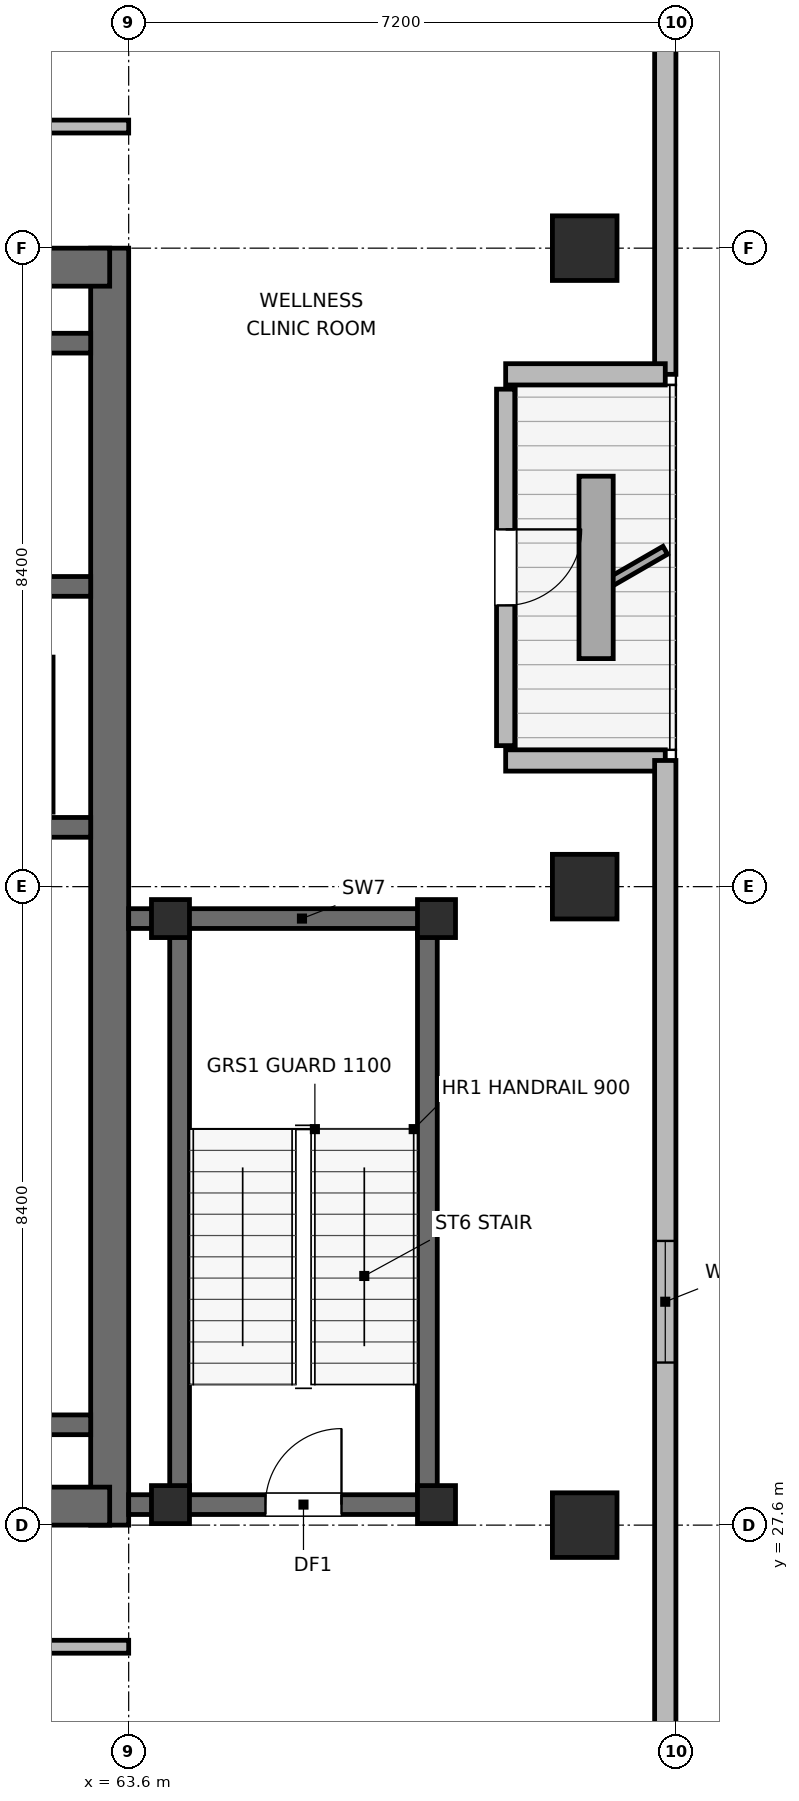
"""IFC4 building model, lengths in metres.
Left out: names, types, materials, properties, quantities, classifications, styles, units other than length and angle.
Written with IfcOpenShell. Run it as: python <this file> out.ifc"""

import sys

from ifc_helpers import new_model, si_unit, direction, frame, frame_2d, origin, origin_2d, place, context, subcontext, project, spatial, rectangle, hollow_rectangle, extrude, element, fill, save


model = new_model("IFC4")
c1 = context("Model", 3, precision=1e-05, world=origin(), true_north=direction((0.0, 1.0)))
c2 = subcontext(c1, "Body", "Model", "MODEL_VIEW")
j1 = project(units=[si_unit("LENGTHUNIT", "METRE"), si_unit("PLANEANGLEUNIT", "RADIAN")], contexts=[c1])
p1 = place(None, origin())
s1 = spatial("IfcSite", under=j1, at=p1, CompositionType="ELEMENT")
p2 = place(p1, origin())
s2 = spatial("IfcBuilding", under=s1, at=p2, CompositionType="ELEMENT")
p3 = place(p2, frame((0.0, 0.0, 350.4)))
s3 = spatial("IfcBuildingStorey", under=s2, at=p3, CompositionType="ELEMENT", Elevation=350.4)
p4 = place(p3, frame((63.35, 27.6, 0.0), z_axis=(0.0, 0.0, 1.0), x_axis=(0.0, 1.0, 0.0)))
e1 = element("IfcWall", 1, at=p4, inside=s3, PredefinedType="SHEAR", context=c2, shape_type="SweptSolid", body=[
    extrude(rectangle(XDim=16.8, YDim=0.5, at=frame_2d((8.4, 0.0))), origin(), (0.0, 0.0, 1.0), 4.5),
])
p5 = place(p3, frame((53.85, 27.85, 0.0), z_axis=(0.0, 0.0, 1.0), x_axis=(1.0, 0.0, 0.0)))
e2 = element("IfcWall", 2, at=p5, inside=s3, PredefinedType="SHEAR", context=c2, shape_type="SweptSolid", body=[
    extrude(rectangle(XDim=9.5, YDim=0.5, at=frame_2d((4.75, 0.0))), origin(), (0.0, 0.0, 1.0), 4.5),
])
p6 = place(p5, frame((4.025, 0.0, 0.0)))
e3 = element("IfcOpeningElement", 3, at=p6, cuts=e2, PredefinedType="OPENING", context=c2, shape_type="SweptSolid", body=[
    extrude(rectangle(XDim=1.05, YDim=2.04, at=frame_2d((0.525, 1.02))), frame((0.0, 0.26, 0.0), z_axis=(0.0, -1.0, 0.0), x_axis=(1.0, 0.0, 0.0)), (0.0, 0.0, 1.0), 0.52),
])
p7 = place(p3, frame((53.85, 44.15, 0.0), z_axis=(0.0, 0.0, 1.0), x_axis=(1.0, 0.0, 0.0)))
e4 = element("IfcWall", 4, at=p7, inside=s3, PredefinedType="SHEAR", context=c2, shape_type="SweptSolid", body=[
    extrude(rectangle(XDim=9.5, YDim=0.5, at=frame_2d((4.75, 0.0))), origin(), (0.0, 0.0, 1.0), 4.5),
])
for number, where, z_axis, x_axis in (
    (5, (58.89, 28.92, 0.0), (0.0, 0.0, 1.0), (1.0, 0.0, 0.0)),
    (6, (58.89, 36.78, 0.0), (0.0, 0.0, 1.0), (1.0, 0.0, 0.0)),
):
    element("IfcWall", number, at=place(p3, frame(where, z_axis=z_axis, x_axis=x_axis)), inside=s3, PredefinedType="SHEAR", context=c2, shape_type="SweptSolid", body=[
        extrude(rectangle(XDim=4.21, YDim=0.26, at=frame_2d((2.105, 0.0))), origin(), (0.0, 0.0, 1.0), 4.5),
    ])
p8 = place(p3, frame((54.1, 39.95, 0.0), z_axis=(0.0, 0.0, 1.0), x_axis=(1.0, 0.0, 0.0)))
e7 = element("IfcWall", 7, at=p8, inside=s3, PredefinedType="SHEAR", context=c2, shape_type="SweptSolid", body=[
    extrude(rectangle(XDim=9.0, YDim=0.26, at=frame_2d((4.5, 0.0))), origin(), (0.0, 0.0, 1.0), 4.5),
])
p9 = place(p8, frame((1.1, 0.0, 0.0)))
e8 = element("IfcOpeningElement", 8, at=p9, cuts=e7, PredefinedType="OPENING", context=c2, shape_type="SweptSolid", body=[
    extrude(rectangle(XDim=1.0, YDim=2.04, at=frame_2d((0.5, 1.02))), frame((0.0, 0.14, 0.0), z_axis=(0.0, -1.0, 0.0), x_axis=(1.0, 0.0, 0.0)), (0.0, 0.0, 1.0), 0.28),
])
p10 = place(p3, frame((54.1, 43.15, 0.0), z_axis=(0.0, 0.0, 1.0), x_axis=(1.0, 0.0, 0.0)))
e9 = element("IfcWall", 9, at=p10, inside=s3, PredefinedType="SHEAR", context=c2, shape_type="SweptSolid", body=[
    extrude(rectangle(XDim=9.0, YDim=0.26, at=frame_2d((4.5, 0.0))), origin(), (0.0, 0.0, 1.0), 4.5),
])
p11 = place(p3, frame((63.6, 27.87, 0.0), z_axis=(0.0, 0.0, 1.0), x_axis=(1.0, 0.0, 0.0)))
e10 = element("IfcWall", 10, at=p11, inside=s3, PredefinedType="SHEAR", context=c2, shape_type="SweptSolid", body=[
    extrude(rectangle(XDim=4.06, YDim=0.26, at=frame_2d((2.03, 0.0))), origin(), (0.0, 0.0, 1.0), 4.5),
])
p12 = place(p11, frame((1.8, 0.0, 0.0)))
e11 = element("IfcOpeningElement", 11, at=p12, cuts=e10, PredefinedType="OPENING", context=c2, shape_type="SweptSolid", body=[
    extrude(rectangle(XDim=1.0, YDim=2.04, at=frame_2d((0.5, 1.02))), frame((0.0, 0.14, 0.0), z_axis=(0.0, -1.0, 0.0), x_axis=(1.0, 0.0, 0.0)), (0.0, 0.0, 1.0), 0.28),
])
p13 = place(p3, frame((63.6, 35.58, 0.0), z_axis=(0.0, 0.0, 1.0), x_axis=(1.0, 0.0, 0.0)))
e12 = element("IfcWall", 12, at=p13, inside=s3, PredefinedType="SHEAR", context=c2, shape_type="SweptSolid", body=[
    extrude(rectangle(XDim=4.06, YDim=0.26, at=frame_2d((2.03, 0.0))), origin(), (0.0, 0.0, 1.0), 4.5),
])
for number, where, z_axis, x_axis in (
    (13, (64.27, 28.0, 0.0), (0.0, 0.0, 1.0), (0.0, 1.0, 0.0)),
    (14, (67.53, 28.0, 0.0), (0.0, 0.0, 1.0), (0.0, 1.0, 0.0)),
):
    element("IfcWall", number, at=place(p3, frame(where, z_axis=z_axis, x_axis=x_axis)), inside=s3, PredefinedType="SHEAR", context=c2, shape_type="SweptSolid", body=[
        extrude(rectangle(XDim=7.45, YDim=0.26, at=frame_2d((3.725, 0.0))), origin(), (0.0, 0.0, 1.0), 4.5),
    ])
for number, where, z_axis, x_axis in (
    (15, (69.6, 27.6, 0.0), (0.0, 0.0, 1.0), (1.0, 0.0, 0.0)),
    (16, (69.6, 36.0, 0.0), (0.0, 0.0, 1.0), (1.0, 0.0, 0.0)),
    (17, (69.6, 44.4, 0.0), (0.0, 0.0, 1.0), (1.0, 0.0, 0.0)),
):
    element("IfcColumn", number, at=place(p3, frame(where, z_axis=z_axis, x_axis=x_axis)), inside=s3, PredefinedType="COLUMN", context=c2, shape_type="SweptSolid", body=[
        extrude(rectangle(XDim=0.85, YDim=0.85, at=origin_2d()), origin(), (0.0, 0.0, 1.0), 4.5),
    ])
for number, where, z_axis, x_axis in (
    (18, (64.15, 27.87, 0.0), (0.0, 0.0, 1.0), (1.0, 0.0, 0.0)),
    (19, (67.65, 27.87, 0.0), (0.0, 0.0, 1.0), (1.0, 0.0, 0.0)),
    (20, (64.15, 35.58, 0.0), (0.0, 0.0, 1.0), (1.0, 0.0, 0.0)),
    (21, (67.65, 35.58, 0.0), (0.0, 0.0, 1.0), (1.0, 0.0, 0.0)),
):
    element("IfcColumn", number, at=place(p3, frame(where, z_axis=z_axis, x_axis=x_axis)), inside=s3, PredefinedType="PILASTER", context=c2, shape_type="SweptSolid", body=[
        extrude(hollow_rectangle(XDim=0.5, YDim=0.5, WallThickness=0.025, at=origin_2d()), origin(), (0.0, 0.0, 1.0), 4.5),
    ])
p14 = place(p3, frame((70.66, 48.582, 0.0), z_axis=(0.0, 0.0, 1.0), x_axis=(0.0, -1.0, 0.0)))
e22 = element("IfcWall", 22, at=p14, inside=s3, PredefinedType="SOLIDWALL", context=c2, shape_type="SweptSolid", body=[
    extrude(rectangle(XDim=5.842, YDim=0.28, at=frame_2d((2.921, 0.0))), origin(), (0.0, 0.0, 1.0), 4.2),
])
p15 = place(p3, frame((70.66, 42.74, 0.0), z_axis=(0.0, 0.0, 1.0), x_axis=(-1.0, 0.0, 0.0)))
e23 = element("IfcWall", 23, at=p15, inside=s3, PredefinedType="SOLIDWALL", context=c2, shape_type="SweptSolid", body=[
    extrude(rectangle(XDim=2.1, YDim=0.28, at=frame_2d((1.05, 0.0))), origin(), (0.0, 0.0, 1.0), 2.695),
])
p16 = place(p3, frame((68.56, 42.545, 0.0), z_axis=(0.0, 0.0, 1.0), x_axis=(0.0, -1.0, 0.0)))
e24 = element("IfcWall", 24, at=p16, inside=s3, PredefinedType="SOLIDWALL", context=c2, shape_type="SweptSolid", body=[
    extrude(rectangle(XDim=4.69, YDim=0.24, at=frame_2d((2.345, 0.0))), origin(), (0.0, 0.0, 1.0), 3.791),
])
p17 = place(p16, frame((1.845, 0.0, 0.0)))
e25 = element("IfcOpeningElement", 25, at=p17, cuts=e24, PredefinedType="OPENING", context=c2, shape_type="SweptSolid", body=[
    extrude(rectangle(XDim=1.0, YDim=2.02, at=frame_2d((0.5, 1.01))), frame((0.0, 0.13, 0.0), z_axis=(0.0, -1.0, 0.0), x_axis=(1.0, 0.0, 0.0)), (0.0, 0.0, 1.0), 0.26),
])
p18 = place(p3, frame((68.56, 37.66, 0.0), z_axis=(0.0, 0.0, 1.0), x_axis=(1.0, 0.0, 0.0)))
e26 = element("IfcWall", 26, at=p18, inside=s3, PredefinedType="SOLIDWALL", context=c2, shape_type="SweptSolid", body=[
    extrude(rectangle(XDim=2.1, YDim=0.28, at=frame_2d((1.05, 0.0))), origin(), (0.0, 0.0, 1.0), 2.695),
])
p19 = place(p3, frame((70.66, 37.66, 0.0), z_axis=(0.0, 0.0, 1.0), x_axis=(0.0, -1.0, 0.0)))
e27 = element("IfcWall", 27, at=p19, inside=s3, PredefinedType="SOLIDWALL", context=c2, shape_type="SweptSolid", body=[
    extrude(rectangle(XDim=14.241, YDim=0.28, at=frame_2d((7.121, 0.0))), origin(), (0.0, 0.0, 1.0), 4.2),
])
p20 = place(p19, frame((6.321, 0.0, 0.85)))
e28 = element("IfcOpeningElement", 28, at=p20, cuts=e27, PredefinedType="OPENING", context=c2, shape_type="SweptSolid", body=[
    extrude(rectangle(XDim=1.6, YDim=1.0, at=frame_2d((0.8, 0.5))), frame((0.0, 0.15, 0.0), z_axis=(0.0, -1.0, 0.0), x_axis=(1.0, 0.0, 0.0)), (0.0, 0.0, 1.0), 0.3),
])
p21 = place(p3, frame((62.5, 36.98, 0.0), z_axis=(0.0, 0.0, 1.0), x_axis=(0.0, 1.0, 0.0)))
e29 = element("IfcWall", 29, at=p21, inside=s3, PredefinedType="PARTITIONING", context=c2, shape_type="SweptSolid", body=[
    extrude(rectangle(XDim=2.04, YDim=0.21, at=frame_2d((1.02, 0.0))), origin(), (0.0, 0.0, 1.0), 4.2),
])
p22 = place(p3, frame((30.725, 26.0, 0.0), z_axis=(0.0, 0.0, 1.0), x_axis=(1.0, 0.0, 0.0)))
e30 = element("IfcWall", 30, at=p22, inside=s3, PredefinedType="PARTITIONING", context=c2, shape_type="SweptSolid", body=[
    extrude(rectangle(XDim=32.875, YDim=0.17, at=frame_2d((16.438, 0.0))), origin(), (0.0, 0.0, 1.0), 4.2),
])
p23 = place(p22, frame((2.027, 0.0, 0.0)))
e31 = element("IfcOpeningElement", 31, at=p23, cuts=e30, PredefinedType="OPENING", context=c2, shape_type="SweptSolid", body=[
    extrude(rectangle(XDim=0.95, YDim=2.04, at=frame_2d((0.475, 1.02))), frame((0.0, 0.095, 0.0), z_axis=(0.0, -1.0, 0.0), x_axis=(1.0, 0.0, 0.0)), (0.0, 0.0, 1.0), 0.19),
])
p24 = place(p22, frame((6.435, 0.0, 0.0)))
e32 = element("IfcOpeningElement", 32, at=p24, cuts=e30, PredefinedType="OPENING", context=c2, shape_type="SweptSolid", body=[
    extrude(rectangle(XDim=0.95, YDim=2.04, at=frame_2d((0.475, 1.02))), frame((0.0, 0.095, 0.0), z_axis=(0.0, -1.0, 0.0), x_axis=(1.0, 0.0, 0.0)), (0.0, 0.0, 1.0), 0.19),
])
p25 = place(p22, frame((10.245, 0.0, 0.0)))
e33 = element("IfcOpeningElement", 33, at=p25, cuts=e30, PredefinedType="OPENING", context=c2, shape_type="SweptSolid", body=[
    extrude(rectangle(XDim=0.95, YDim=2.04, at=frame_2d((0.475, 1.02))), frame((0.0, 0.095, 0.0), z_axis=(0.0, -1.0, 0.0), x_axis=(1.0, 0.0, 0.0)), (0.0, 0.0, 1.0), 0.19),
])
p26 = place(p22, frame((14.055, 0.0, 0.0)))
e34 = element("IfcOpeningElement", 34, at=p26, cuts=e30, PredefinedType="OPENING", context=c2, shape_type="SweptSolid", body=[
    extrude(rectangle(XDim=0.95, YDim=2.04, at=frame_2d((0.475, 1.02))), frame((0.0, 0.095, 0.0), z_axis=(0.0, -1.0, 0.0), x_axis=(1.0, 0.0, 0.0)), (0.0, 0.0, 1.0), 0.19),
])
p27 = place(p22, frame((17.865, 0.0, 0.0)))
e35 = element("IfcOpeningElement", 35, at=p27, cuts=e30, PredefinedType="OPENING", context=c2, shape_type="SweptSolid", body=[
    extrude(rectangle(XDim=0.95, YDim=2.04, at=frame_2d((0.475, 1.02))), frame((0.0, 0.095, 0.0), z_axis=(0.0, -1.0, 0.0), x_axis=(1.0, 0.0, 0.0)), (0.0, 0.0, 1.0), 0.19),
])
p28 = place(p22, frame((21.675, 0.0, 0.0)))
e36 = element("IfcOpeningElement", 36, at=p28, cuts=e30, PredefinedType="OPENING", context=c2, shape_type="SweptSolid", body=[
    extrude(rectangle(XDim=0.95, YDim=2.04, at=frame_2d((0.475, 1.02))), frame((0.0, 0.095, 0.0), z_axis=(0.0, -1.0, 0.0), x_axis=(1.0, 0.0, 0.0)), (0.0, 0.0, 1.0), 0.19),
])
p29 = place(p22, frame((25.485, 0.0, 0.0)))
e37 = element("IfcOpeningElement", 37, at=p29, cuts=e30, PredefinedType="OPENING", context=c2, shape_type="SweptSolid", body=[
    extrude(rectangle(XDim=0.95, YDim=2.04, at=frame_2d((0.475, 1.02))), frame((0.0, 0.095, 0.0), z_axis=(0.0, -1.0, 0.0), x_axis=(1.0, 0.0, 0.0)), (0.0, 0.0, 1.0), 0.19),
])
p30 = place(p22, frame((29.895, 0.0, 0.0)))
e38 = element("IfcOpeningElement", 38, at=p30, cuts=e30, PredefinedType="OPENING", context=c2, shape_type="SweptSolid", body=[
    extrude(rectangle(XDim=0.95, YDim=2.04, at=frame_2d((0.475, 1.02))), frame((0.0, 0.095, 0.0), z_axis=(0.0, -1.0, 0.0), x_axis=(1.0, 0.0, 0.0)), (0.0, 0.0, 1.0), 0.19),
])
p31 = place(p3, frame((30.725, 46.0, 0.0), z_axis=(0.0, 0.0, 1.0), x_axis=(1.0, 0.0, 0.0)))
e39 = element("IfcWall", 39, at=p31, inside=s3, PredefinedType="PARTITIONING", context=c2, shape_type="SweptSolid", body=[
    extrude(rectangle(XDim=32.875, YDim=0.17, at=frame_2d((16.438, 0.0))), origin(), (0.0, 0.0, 1.0), 4.2),
])
p32 = place(p31, frame((3.487, 0.0, 0.0)))
e40 = element("IfcOpeningElement", 40, at=p32, cuts=e39, PredefinedType="OPENING", context=c2, shape_type="SweptSolid", body=[
    extrude(rectangle(XDim=0.95, YDim=2.04, at=frame_2d((0.475, 1.02))), frame((0.0, 0.095, 0.0), z_axis=(0.0, -1.0, 0.0), x_axis=(1.0, 0.0, 0.0)), (0.0, 0.0, 1.0), 0.19),
])
p33 = place(p31, frame((8.685, 0.0, 0.0)))
e41 = element("IfcOpeningElement", 41, at=p33, cuts=e39, PredefinedType="OPENING", context=c2, shape_type="SweptSolid", body=[
    extrude(rectangle(XDim=0.95, YDim=2.04, at=frame_2d((0.475, 1.02))), frame((0.0, 0.095, 0.0), z_axis=(0.0, -1.0, 0.0), x_axis=(1.0, 0.0, 0.0)), (0.0, 0.0, 1.0), 0.19),
])
p34 = place(p31, frame((13.835, 0.0, 0.0)))
e42 = element("IfcOpeningElement", 42, at=p34, cuts=e39, PredefinedType="OPENING", context=c2, shape_type="SweptSolid", body=[
    extrude(rectangle(XDim=0.95, YDim=2.04, at=frame_2d((0.475, 1.02))), frame((0.0, 0.095, 0.0), z_axis=(0.0, -1.0, 0.0), x_axis=(1.0, 0.0, 0.0)), (0.0, 0.0, 1.0), 0.19),
])
p35 = place(p31, frame((20.22, 0.0, 0.0)))
e43 = element("IfcOpeningElement", 43, at=p35, cuts=e39, PredefinedType="OPENING", context=c2, shape_type="SweptSolid", body=[
    extrude(rectangle(XDim=0.95, YDim=2.04, at=frame_2d((0.475, 1.02))), frame((0.0, 0.095, 0.0), z_axis=(0.0, -1.0, 0.0), x_axis=(1.0, 0.0, 0.0)), (0.0, 0.0, 1.0), 0.19),
])
p36 = place(p31, frame((25.71, 0.0, 0.0)))
e44 = element("IfcOpeningElement", 44, at=p36, cuts=e39, PredefinedType="OPENING", context=c2, shape_type="SweptSolid", body=[
    extrude(rectangle(XDim=0.95, YDim=2.04, at=frame_2d((0.475, 1.02))), frame((0.0, 0.095, 0.0), z_axis=(0.0, -1.0, 0.0), x_axis=(1.0, 0.0, 0.0)), (0.0, 0.0, 1.0), 0.19),
])
p37 = place(p31, frame((30.565, 0.0, 0.0)))
e45 = element("IfcOpeningElement", 45, at=p37, cuts=e39, PredefinedType="OPENING", context=c2, shape_type="SweptSolid", body=[
    extrude(rectangle(XDim=0.95, YDim=2.04, at=frame_2d((0.475, 1.02))), frame((0.0, 0.095, 0.0), z_axis=(0.0, -1.0, 0.0), x_axis=(1.0, 0.0, 0.0)), (0.0, 0.0, 1.0), 0.19),
])
p38 = place(p17, origin())
e46 = element("IfcDoor", 46, at=p38, inside=s3, OperationType="SINGLE_SWING_LEFT", PredefinedType="DOOR", context=c2, shape_type="SweptSolid", body=[
    extrude(rectangle(XDim=1.0, YDim=2.02, at=frame_2d((0.5, 1.01))), frame((0.0, 0.025, 0.0), z_axis=(0.0, -1.0, 0.0), x_axis=(1.0, 0.0, 0.0)), (0.0, 0.0, 1.0), 0.05),
])
fill(e25, e46)
p39 = place(p20, origin())
e47 = element("IfcWindow", 47, at=p39, inside=s3, PartitioningType="SINGLE_PANEL", PredefinedType="WINDOW", context=c2, shape_type="SweptSolid", body=[
    extrude(rectangle(XDim=1.6, YDim=1.0, at=frame_2d((0.8, 0.5))), frame((0.0, 0.03, 0.0), z_axis=(0.0, -1.0, 0.0), x_axis=(1.0, 0.0, 0.0)), (0.0, 0.0, 1.0), 0.06),
])
fill(e28, e47)
p40 = place(p12, origin())
e48 = element("IfcDoor", 48, at=p40, inside=s3, OperationType="SINGLE_SWING_RIGHT", PredefinedType="DOOR", context=c2, shape_type="SweptSolid", body=[
    extrude(rectangle(XDim=1.0, YDim=2.04, at=frame_2d((0.5, 1.02))), frame((0.0, 0.025, 0.0), z_axis=(0.0, -1.0, 0.0), x_axis=(1.0, 0.0, 0.0)), (0.0, 0.0, 1.0), 0.05),
])
fill(e11, e48)
save(model, sys.argv[1])
